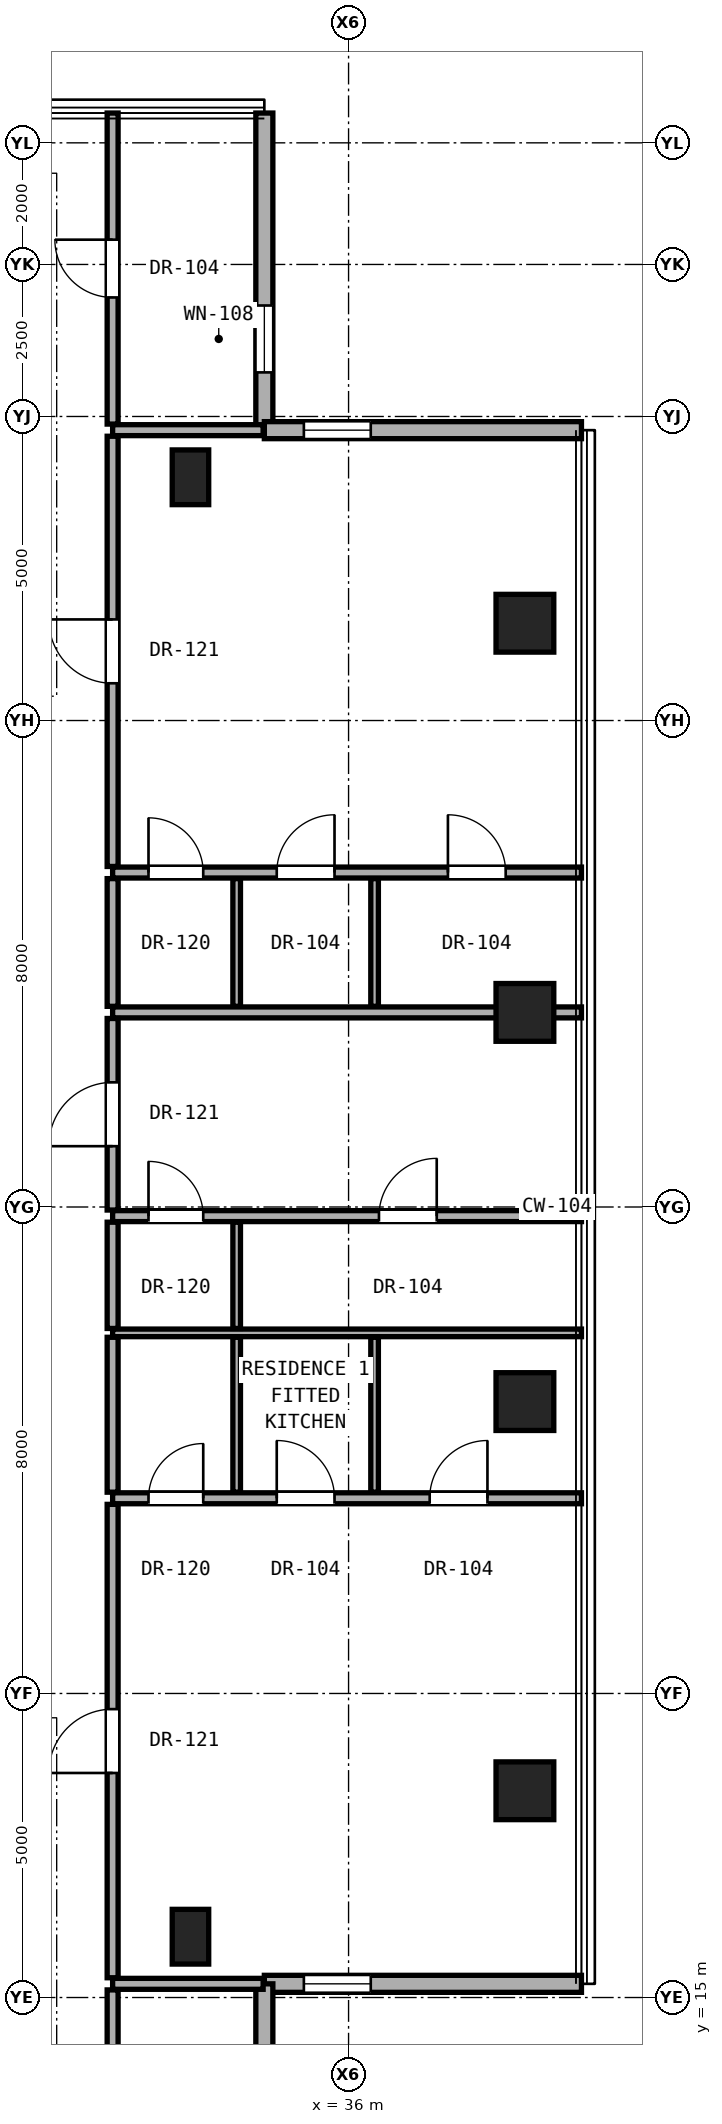
"""IFC4 building model, lengths in metres.
Left out: names, types, materials, properties, quantities, classifications, styles, units other than length and angle.
Written with IfcOpenShell. Run it as: python <this file> out.ifc"""

import sys

from ifc_helpers import new_model, si_unit, direction, frame, frame_2d, origin, origin_2d, place, context, subcontext, project, spatial, rectangle, hollow_rectangle, extrude, element, fill, save


model = new_model("IFC4")
c1 = context("Model", 3, precision=1e-05, world=origin(), true_north=direction((0.0, 1.0)))
c2 = subcontext(c1, "Body", "Model", "MODEL_VIEW")
j1 = project(units=[si_unit("LENGTHUNIT", "METRE"), si_unit("PLANEANGLEUNIT", "RADIAN")], contexts=[c1])
p1 = place(None, origin())
s1 = spatial("IfcSite", under=j1, at=p1, CompositionType="ELEMENT")
p2 = place(p1, origin())
s2 = spatial("IfcBuilding", under=s1, at=p2, CompositionType="ELEMENT")
p3 = place(p2, frame((0.0, 0.0, 183.65)))
s3 = spatial("IfcBuildingStorey", under=s2, at=p3, CompositionType="ELEMENT", Elevation=183.65)
for number, where, z_axis, x_axis in (
    (1, (38.9, 18.4, 0.0), (0.0, 0.0, 1.0), (1.0, 0.0, 0.0)),
    (2, (38.9, 24.8, 0.0), (0.0, 0.0, 1.0), (1.0, 0.0, 0.0)),
    (3, (38.9, 31.2, 0.0), (0.0, 0.0, 1.0), (1.0, 0.0, 0.0)),
    (4, (38.9, 37.6, 0.0), (0.0, 0.0, 1.0), (1.0, 0.0, 0.0)),
):
    element("IfcColumn", number, at=place(p3, frame(where, z_axis=z_axis, x_axis=x_axis)), inside=s3, PredefinedType="COLUMN", context=c2, shape_type="SweptSolid", body=[
        extrude(hollow_rectangle(XDim=0.95, YDim=0.95, WallThickness=0.05, at=origin_2d()), origin(), (0.0, 0.0, 1.0), 3.25),
    ])
for number, where, z_axis, x_axis in (
    (5, (33.4, 16.0, 0.0), (0.0, 0.0, 1.0), (1.0, 0.0, 0.0)),
    (6, (33.4, 40.0, 0.0), (0.0, 0.0, 1.0), (1.0, 0.0, 0.0)),
):
    element("IfcColumn", number, at=place(p3, frame(where, z_axis=z_axis, x_axis=x_axis)), inside=s3, PredefinedType="PILASTER", context=c2, shape_type="SweptSolid", body=[
        extrude(rectangle(XDim=0.6, YDim=0.9, at=origin_2d()), origin(), (0.0, 0.0, 1.0), 3.25),
    ])
p4 = place(p3, frame((34.615, 40.775, 0.0), z_axis=(0.0, 0.0, 1.0), x_axis=(0.0, 1.0, 0.0)))
e7 = element("IfcWall", 7, at=p4, inside=s3, PredefinedType="SOLIDWALL", context=c2, shape_type="SweptSolid", body=[
    extrude(rectangle(XDim=5.215, YDim=0.28, at=frame_2d((2.607, 0.0))), origin(), (0.0, 0.0, 1.0), 3.03),
])
p5 = place(p4, frame((0.95, 0.0, 0.85)))
e8 = element("IfcOpeningElement", 8, at=p5, cuts=e7, PredefinedType="OPENING", context=c2, shape_type="SweptSolid", body=[
    extrude(rectangle(XDim=1.1, YDim=2.0, at=frame_2d((0.55, 1.0))), frame((0.0, 0.15, 0.0), z_axis=(0.0, -1.0, 0.0), x_axis=(1.0, 0.0, 0.0)), (0.0, 0.0, 1.0), 0.3),
])
p6 = place(p3, frame((34.615, 15.225, 0.0), z_axis=(0.0, 0.0, 1.0), x_axis=(1.0, 0.0, 0.0)))
e9 = element("IfcWall", 9, at=p6, inside=s3, PredefinedType="SOLIDWALL", context=c2, shape_type="SweptSolid", body=[
    extrude(rectangle(XDim=5.215, YDim=0.28, at=frame_2d((2.607, 0.0))), origin(), (0.0, 0.0, 1.0), 3.03),
])
p7 = place(p6, frame((0.65, 0.0, 0.85)))
e10 = element("IfcOpeningElement", 10, at=p7, cuts=e9, PredefinedType="OPENING", context=c2, shape_type="SweptSolid", body=[
    extrude(rectangle(XDim=1.1, YDim=2.0, at=frame_2d((0.55, 1.0))), frame((0.0, 0.15, 0.0), z_axis=(0.0, -1.0, 0.0), x_axis=(1.0, 0.0, 0.0)), (0.0, 0.0, 1.0), 0.3),
])
p8 = place(p3, frame((34.615, 10.01, 0.0), z_axis=(0.0, 0.0, 1.0), x_axis=(0.0, 1.0, 0.0)))
e11 = element("IfcWall", 11, at=p8, inside=s3, PredefinedType="SOLIDWALL", context=c2, shape_type="SweptSolid", body=[
    extrude(rectangle(XDim=5.215, YDim=0.28, at=frame_2d((2.607, 0.0))), origin(), (0.0, 0.0, 1.0), 3.03),
])
p9 = place(p3, frame((39.83, 40.775, 0.0), z_axis=(0.0, 0.0, 1.0), x_axis=(-1.0, 0.0, 0.0)))
e12 = element("IfcWall", 12, at=p9, inside=s3, PredefinedType="SOLIDWALL", context=c2, shape_type="SweptSolid", body=[
    extrude(rectangle(XDim=5.215, YDim=0.28, at=frame_2d((2.607, 0.0))), origin(), (0.0, 0.0, 1.0), 3.03),
])
p10 = place(p9, frame((3.465, 0.0, 0.85)))
e13 = element("IfcOpeningElement", 13, at=p10, cuts=e12, PredefinedType="OPENING", context=c2, shape_type="SweptSolid", body=[
    extrude(rectangle(XDim=1.1, YDim=2.0, at=frame_2d((0.55, 1.0))), frame((0.0, 0.15, 0.0), z_axis=(0.0, -1.0, 0.0), x_axis=(1.0, 0.0, 0.0)), (0.0, 0.0, 1.0), 0.3),
])
p11 = place(p3, frame((32.12, 15.225, 0.0), z_axis=(0.0, 0.0, 1.0), x_axis=(1.0, 0.0, 0.0)))
e14 = element("IfcWall", 14, at=p11, inside=s3, PredefinedType="PARTITIONING", context=c2, shape_type="SweptSolid", body=[
    extrude(rectangle(XDim=2.475, YDim=0.18, at=frame_2d((1.237, 0.0))), origin(), (0.0, 0.0, 1.0), 3.05),
])
p12 = place(p3, frame((32.12, 23.21, 0.0), z_axis=(0.0, 0.0, 1.0), x_axis=(1.0, 0.0, 0.0)))
e15 = element("IfcWall", 15, at=p12, inside=s3, PredefinedType="PARTITIONING", context=c2, shape_type="SweptSolid", body=[
    extrude(rectangle(XDim=7.71, YDim=0.18, at=frame_2d((3.855, 0.0))), origin(), (0.0, 0.0, 1.0), 2.269),
])
p13 = place(p12, frame((5.214, 0.0, 0.0)))
e16 = element("IfcOpeningElement", 16, at=p13, cuts=e15, PredefinedType="OPENING", context=c2, shape_type="SweptSolid", body=[
    extrude(rectangle(XDim=0.95, YDim=2.15, at=frame_2d((0.475, 1.075))), frame((0.0, 0.1, 0.0), z_axis=(0.0, -1.0, 0.0), x_axis=(1.0, 0.0, 0.0)), (0.0, 0.0, 1.0), 0.2),
])
p14 = place(p12, frame((2.699, 0.0, 0.0)))
e17 = element("IfcOpeningElement", 17, at=p14, cuts=e15, PredefinedType="OPENING", context=c2, shape_type="SweptSolid", body=[
    extrude(rectangle(XDim=0.95, YDim=2.15, at=frame_2d((0.475, 1.075))), frame((0.0, 0.1, 0.0), z_axis=(0.0, -1.0, 0.0), x_axis=(1.0, 0.0, 0.0)), (0.0, 0.0, 1.0), 0.2),
])
p15 = place(p12, frame((0.59, 0.0, 0.0)))
e18 = element("IfcOpeningElement", 18, at=p15, cuts=e15, PredefinedType="OPENING", context=c2, shape_type="SweptSolid", body=[
    extrude(rectangle(XDim=0.9, YDim=2.1, at=frame_2d((0.45, 1.05))), frame((0.0, 0.1, 0.0), z_axis=(0.0, -1.0, 0.0), x_axis=(1.0, 0.0, 0.0)), (0.0, 0.0, 1.0), 0.2),
])
p16 = place(p3, frame((32.12, 25.93, 0.0), z_axis=(0.0, 0.0, 1.0), x_axis=(1.0, 0.0, 0.0)))
e19 = element("IfcWall", 19, at=p16, inside=s3, PredefinedType="PARTITIONING", context=c2, shape_type="SweptSolid", body=[
    extrude(rectangle(XDim=7.71, YDim=0.125, at=frame_2d((3.855, 0.0))), origin(), (0.0, 0.0, 1.0), 2.269),
])
p17 = place(p3, frame((32.12, 27.85, 0.0), z_axis=(0.0, 0.0, 1.0), x_axis=(1.0, 0.0, 0.0)))
e20 = element("IfcWall", 20, at=p17, inside=s3, PredefinedType="PARTITIONING", context=c2, shape_type="SweptSolid", body=[
    extrude(rectangle(XDim=7.71, YDim=0.18, at=frame_2d((3.855, 0.0))), origin(), (0.0, 0.0, 1.0), 2.269),
])
p18 = place(p17, frame((4.38, 0.0, 0.0)))
e21 = element("IfcOpeningElement", 21, at=p18, cuts=e20, PredefinedType="OPENING", context=c2, shape_type="SweptSolid", body=[
    extrude(rectangle(XDim=0.95, YDim=2.15, at=frame_2d((0.475, 1.075))), frame((0.0, 0.1, 0.0), z_axis=(0.0, -1.0, 0.0), x_axis=(1.0, 0.0, 0.0)), (0.0, 0.0, 1.0), 0.2),
])
p19 = place(p17, frame((0.59, 0.0, 0.0)))
e22 = element("IfcOpeningElement", 22, at=p19, cuts=e20, PredefinedType="OPENING", context=c2, shape_type="SweptSolid", body=[
    extrude(rectangle(XDim=0.9, YDim=2.1, at=frame_2d((0.45, 1.05))), frame((0.0, 0.1, 0.0), z_axis=(0.0, -1.0, 0.0), x_axis=(1.0, 0.0, 0.0)), (0.0, 0.0, 1.0), 0.2),
])
p20 = place(p3, frame((32.12, 31.2, 0.0), z_axis=(0.0, 0.0, 1.0), x_axis=(1.0, 0.0, 0.0)))
e23 = element("IfcWall", 23, at=p20, inside=s3, PredefinedType="PARTITIONING", context=c2, shape_type="SweptSolid", body=[
    extrude(rectangle(XDim=7.71, YDim=0.18, at=frame_2d((3.855, 0.0))), origin(), (0.0, 0.0, 1.0), 2.269),
])
p21 = place(p3, frame((32.12, 33.5, 0.0), z_axis=(0.0, 0.0, 1.0), x_axis=(1.0, 0.0, 0.0)))
e24 = element("IfcWall", 24, at=p21, inside=s3, PredefinedType="PARTITIONING", context=c2, shape_type="SweptSolid", body=[
    extrude(rectangle(XDim=7.71, YDim=0.18, at=frame_2d((3.855, 0.0))), origin(), (0.0, 0.0, 1.0), 2.269),
])
p22 = place(p21, frame((5.514, 0.0, 0.0)))
e25 = element("IfcOpeningElement", 25, at=p22, cuts=e24, PredefinedType="OPENING", context=c2, shape_type="SweptSolid", body=[
    extrude(rectangle(XDim=0.95, YDim=2.15, at=frame_2d((0.475, 1.075))), frame((0.0, 0.1, 0.0), z_axis=(0.0, -1.0, 0.0), x_axis=(1.0, 0.0, 0.0)), (0.0, 0.0, 1.0), 0.2),
])
p23 = place(p21, frame((2.699, 0.0, 0.0)))
e26 = element("IfcOpeningElement", 26, at=p23, cuts=e24, PredefinedType="OPENING", context=c2, shape_type="SweptSolid", body=[
    extrude(rectangle(XDim=0.95, YDim=2.15, at=frame_2d((0.475, 1.075))), frame((0.0, 0.1, 0.0), z_axis=(0.0, -1.0, 0.0), x_axis=(1.0, 0.0, 0.0)), (0.0, 0.0, 1.0), 0.2),
])
p24 = place(p21, frame((0.59, 0.0, 0.0)))
e27 = element("IfcOpeningElement", 27, at=p24, cuts=e24, PredefinedType="OPENING", context=c2, shape_type="SweptSolid", body=[
    extrude(rectangle(XDim=0.9, YDim=2.1, at=frame_2d((0.45, 1.05))), frame((0.0, 0.1, 0.0), z_axis=(0.0, -1.0, 0.0), x_axis=(1.0, 0.0, 0.0)), (0.0, 0.0, 1.0), 0.2),
])
p25 = place(p3, frame((32.12, 40.775, 0.0), z_axis=(0.0, 0.0, 1.0), x_axis=(1.0, 0.0, 0.0)))
e28 = element("IfcWall", 28, at=p25, inside=s3, PredefinedType="PARTITIONING", context=c2, shape_type="SweptSolid", body=[
    extrude(rectangle(XDim=2.475, YDim=0.18, at=frame_2d((1.237, 0.0))), origin(), (0.0, 0.0, 1.0), 3.05),
])
p26 = place(p3, frame((32.12, 10.01, 0.0), z_axis=(0.0, 0.0, 1.0), x_axis=(0.0, 1.0, 0.0)))
e29 = element("IfcWall", 29, at=p26, inside=s3, PredefinedType="PARTITIONING", context=c2, shape_type="SweptSolid", body=[
    extrude(rectangle(XDim=5.115, YDim=0.18, at=frame_2d((2.558, 0.0))), origin(), (0.0, 0.0, 1.0), 3.05),
])
p27 = place(p26, frame((2.083, 0.0, 0.0)))
e30 = element("IfcOpeningElement", 30, at=p27, cuts=e29, PredefinedType="OPENING", context=c2, shape_type="SweptSolid", body=[
    extrude(rectangle(XDim=0.95, YDim=2.15, at=frame_2d((0.475, 1.075))), frame((0.0, 0.1, 0.0), z_axis=(0.0, -1.0, 0.0), x_axis=(1.0, 0.0, 0.0)), (0.0, 0.0, 1.0), 0.2),
])
p28 = place(p3, frame((32.12, 15.325, 0.0), z_axis=(0.0, 0.0, 1.0), x_axis=(0.0, 1.0, 0.0)))
e31 = element("IfcWall", 31, at=p28, inside=s3, PredefinedType="PARTITIONING", context=c2, shape_type="SweptSolid", body=[
    extrude(rectangle(XDim=7.785, YDim=0.18, at=frame_2d((3.893, 0.0))), origin(), (0.0, 0.0, 1.0), 2.442),
])
p29 = place(p28, frame((3.367, 0.0, 0.0)))
e32 = element("IfcOpeningElement", 32, at=p29, cuts=e31, PredefinedType="OPENING", context=c2, shape_type="SweptSolid", body=[
    extrude(rectangle(XDim=1.05, YDim=2.2, at=frame_2d((0.525, 1.1))), frame((0.0, 0.1, 0.0), z_axis=(0.0, -1.0, 0.0), x_axis=(1.0, 0.0, 0.0)), (0.0, 0.0, 1.0), 0.2),
])
p30 = place(p3, frame((32.12, 23.31, 0.0), z_axis=(0.0, 0.0, 1.0), x_axis=(0.0, 1.0, 0.0)))
e33 = element("IfcWall", 33, at=p30, inside=s3, PredefinedType="PARTITIONING", context=c2, shape_type="SweptSolid", body=[
    extrude(rectangle(XDim=2.547, YDim=0.18, at=frame_2d((1.274, 0.0))), origin(), (0.0, 0.0, 1.0), 2.346),
])
p31 = place(p3, frame((32.12, 26.002, 0.0), z_axis=(0.0, 0.0, 1.0), x_axis=(0.0, 1.0, 0.0)))
e34 = element("IfcWall", 34, at=p31, inside=s3, PredefinedType="PARTITIONING", context=c2, shape_type="SweptSolid", body=[
    extrude(rectangle(XDim=1.748, YDim=0.18, at=frame_2d((0.874, 0.0))), origin(), (0.0, 0.0, 1.0), 3.05),
])
p32 = place(p3, frame((32.12, 27.95, 0.0), z_axis=(0.0, 0.0, 1.0), x_axis=(0.0, 1.0, 0.0)))
e35 = element("IfcWall", 35, at=p32, inside=s3, PredefinedType="PARTITIONING", context=c2, shape_type="SweptSolid", body=[
    extrude(rectangle(XDim=3.15, YDim=0.18, at=frame_2d((1.575, 0.0))), origin(), (0.0, 0.0, 1.0), 2.346),
])
p33 = place(p32, frame((1.05, 0.0, 0.0)))
e36 = element("IfcOpeningElement", 36, at=p33, cuts=e35, PredefinedType="OPENING", context=c2, shape_type="SweptSolid", body=[
    extrude(rectangle(XDim=1.05, YDim=2.2, at=frame_2d((0.525, 1.1))), frame((0.0, 0.1, 0.0), z_axis=(0.0, -1.0, 0.0), x_axis=(1.0, 0.0, 0.0)), (0.0, 0.0, 1.0), 0.2),
])
p34 = place(p3, frame((32.12, 31.3, 0.0), z_axis=(0.0, 0.0, 1.0), x_axis=(0.0, 1.0, 0.0)))
e37 = element("IfcWall", 37, at=p34, inside=s3, PredefinedType="PARTITIONING", context=c2, shape_type="SweptSolid", body=[
    extrude(rectangle(XDim=2.1, YDim=0.18, at=frame_2d((1.05, 0.0))), origin(), (0.0, 0.0, 1.0), 2.346),
])
p35 = place(p3, frame((32.12, 33.6, 0.0), z_axis=(0.0, 0.0, 1.0), x_axis=(0.0, 1.0, 0.0)))
e38 = element("IfcWall", 38, at=p35, inside=s3, PredefinedType="PARTITIONING", context=c2, shape_type="SweptSolid", body=[
    extrude(rectangle(XDim=7.075, YDim=0.18, at=frame_2d((3.538, 0.0))), origin(), (0.0, 0.0, 1.0), 2.442),
])
p36 = place(p35, frame((3.012, 0.0, 0.0)))
e39 = element("IfcOpeningElement", 39, at=p36, cuts=e38, PredefinedType="OPENING", context=c2, shape_type="SweptSolid", body=[
    extrude(rectangle(XDim=1.05, YDim=2.2, at=frame_2d((0.525, 1.1))), frame((0.0, 0.1, 0.0), z_axis=(0.0, -1.0, 0.0), x_axis=(1.0, 0.0, 0.0)), (0.0, 0.0, 1.0), 0.2),
])
p37 = place(p3, frame((32.12, 40.875, 0.0), z_axis=(0.0, 0.0, 1.0), x_axis=(0.0, 1.0, 0.0)))
e40 = element("IfcWall", 40, at=p37, inside=s3, PredefinedType="PARTITIONING", context=c2, shape_type="SweptSolid", body=[
    extrude(rectangle(XDim=5.115, YDim=0.18, at=frame_2d((2.558, 0.0))), origin(), (0.0, 0.0, 1.0), 3.05),
])
p38 = place(p37, frame((2.083, 0.0, 0.0)))
e41 = element("IfcOpeningElement", 41, at=p38, cuts=e40, PredefinedType="OPENING", context=c2, shape_type="SweptSolid", body=[
    extrude(rectangle(XDim=0.95, YDim=2.15, at=frame_2d((0.475, 1.075))), frame((0.0, 0.1, 0.0), z_axis=(0.0, -1.0, 0.0), x_axis=(1.0, 0.0, 0.0)), (0.0, 0.0, 1.0), 0.2),
])
p39 = place(p3, frame((34.16, 23.31, 0.0), z_axis=(0.0, 0.0, 1.0), x_axis=(0.0, 1.0, 0.0)))
e42 = element("IfcWall", 42, at=p39, inside=s3, PredefinedType="PARTITIONING", context=c2, shape_type="SweptSolid", body=[
    extrude(rectangle(XDim=2.547, YDim=0.125, at=frame_2d((1.274, 0.0))), origin(), (0.0, 0.0, 1.0), 2.346),
])
p40 = place(p3, frame((34.16, 26.002, 0.0), z_axis=(0.0, 0.0, 1.0), x_axis=(0.0, 1.0, 0.0)))
e43 = element("IfcWall", 43, at=p40, inside=s3, PredefinedType="PARTITIONING", context=c2, shape_type="SweptSolid", body=[
    extrude(rectangle(XDim=1.748, YDim=0.125, at=frame_2d((0.874, 0.0))), origin(), (0.0, 0.0, 1.0), 3.05),
])
p41 = place(p3, frame((34.16, 31.3, 0.0), z_axis=(0.0, 0.0, 1.0), x_axis=(0.0, 1.0, 0.0)))
e44 = element("IfcWall", 44, at=p41, inside=s3, PredefinedType="PARTITIONING", context=c2, shape_type="SweptSolid", body=[
    extrude(rectangle(XDim=2.1, YDim=0.125, at=frame_2d((1.05, 0.0))), origin(), (0.0, 0.0, 1.0), 2.346),
])
p42 = place(p3, frame((36.428, 23.31, 0.0), z_axis=(0.0, 0.0, 1.0), x_axis=(0.0, 1.0, 0.0)))
e45 = element("IfcWall", 45, at=p42, inside=s3, PredefinedType="PARTITIONING", context=c2, shape_type="SweptSolid", body=[
    extrude(rectangle(XDim=2.547, YDim=0.125, at=frame_2d((1.274, 0.0))), origin(), (0.0, 0.0, 1.0), 2.346),
])
p43 = place(p3, frame((36.428, 31.3, 0.0), z_axis=(0.0, 0.0, 1.0), x_axis=(0.0, 1.0, 0.0)))
e46 = element("IfcWall", 46, at=p43, inside=s3, PredefinedType="PARTITIONING", context=c2, shape_type="SweptSolid", body=[
    extrude(rectangle(XDim=2.1, YDim=0.125, at=frame_2d((1.05, 0.0))), origin(), (0.0, 0.0, 1.0), 2.346),
])
p44 = place(p5, origin())
e47 = element("IfcWindow", 47, at=p44, inside=s3, PartitioningType="SINGLE_PANEL", PredefinedType="WINDOW", context=c2, shape_type="SweptSolid", body=[
    extrude(rectangle(XDim=1.1, YDim=2.0, at=frame_2d((0.55, 1.0))), frame((0.0, 0.03, 0.0), z_axis=(0.0, -1.0, 0.0), x_axis=(1.0, 0.0, 0.0)), (0.0, 0.0, 1.0), 0.06),
])
fill(e8, e47)
p45 = place(p7, origin())
e48 = element("IfcWindow", 48, at=p45, inside=s3, PartitioningType="SINGLE_PANEL", PredefinedType="WINDOW", context=c2, shape_type="SweptSolid", body=[
    extrude(rectangle(XDim=1.1, YDim=2.0, at=frame_2d((0.55, 1.0))), frame((0.0, 0.03, 0.0), z_axis=(0.0, -1.0, 0.0), x_axis=(1.0, 0.0, 0.0)), (0.0, 0.0, 1.0), 0.06),
])
fill(e10, e48)
p46 = place(p10, origin())
e49 = element("IfcWindow", 49, at=p46, inside=s3, PartitioningType="SINGLE_PANEL", PredefinedType="WINDOW", context=c2, shape_type="SweptSolid", body=[
    extrude(rectangle(XDim=1.1, YDim=2.0, at=frame_2d((0.55, 1.0))), frame((0.0, 0.03, 0.0), z_axis=(0.0, -1.0, 0.0), x_axis=(1.0, 0.0, 0.0)), (0.0, 0.0, 1.0), 0.06),
])
fill(e13, e49)
p47 = place(p29, origin())
e50 = element("IfcDoor", 50, at=p47, inside=s3, OperationType="SINGLE_SWING_LEFT", PredefinedType="DOOR", context=c2, shape_type="SweptSolid", body=[
    extrude(rectangle(XDim=1.05, YDim=2.2, at=frame_2d((0.525, 1.1))), frame((0.0, 0.025, 0.0), z_axis=(0.0, -1.0, 0.0), x_axis=(1.0, 0.0, 0.0)), (0.0, 0.0, 1.0), 0.05),
])
fill(e32, e50)
p48 = place(p13, origin())
e51 = element("IfcDoor", 51, at=p48, inside=s3, OperationType="SINGLE_SWING_RIGHT", PredefinedType="DOOR", context=c2, shape_type="SweptSolid", body=[
    extrude(rectangle(XDim=0.95, YDim=2.15, at=frame_2d((0.475, 1.075))), frame((0.0, 0.025, 0.0), z_axis=(0.0, -1.0, 0.0), x_axis=(1.0, 0.0, 0.0)), (0.0, 0.0, 1.0), 0.05),
])
fill(e16, e51)
p49 = place(p14, origin())
e52 = element("IfcDoor", 52, at=p49, inside=s3, OperationType="SINGLE_SWING_LEFT", PredefinedType="DOOR", context=c2, shape_type="SweptSolid", body=[
    extrude(rectangle(XDim=0.95, YDim=2.15, at=frame_2d((0.475, 1.075))), frame((0.0, 0.025, 0.0), z_axis=(0.0, -1.0, 0.0), x_axis=(1.0, 0.0, 0.0)), (0.0, 0.0, 1.0), 0.05),
])
fill(e17, e52)
p50 = place(p15, origin())
e53 = element("IfcDoor", 53, at=p50, inside=s3, OperationType="SINGLE_SWING_RIGHT", PredefinedType="DOOR", context=c2, shape_type="SweptSolid", body=[
    extrude(rectangle(XDim=0.9, YDim=2.1, at=frame_2d((0.45, 1.05))), frame((0.0, 0.025, 0.0), z_axis=(0.0, -1.0, 0.0), x_axis=(1.0, 0.0, 0.0)), (0.0, 0.0, 1.0), 0.05),
])
fill(e18, e53)
p51 = place(p33, origin())
e54 = element("IfcDoor", 54, at=p51, inside=s3, OperationType="SINGLE_SWING_LEFT", PredefinedType="DOOR", context=c2, shape_type="SweptSolid", body=[
    extrude(rectangle(XDim=1.05, YDim=2.2, at=frame_2d((0.525, 1.1))), frame((0.0, 0.025, 0.0), z_axis=(0.0, -1.0, 0.0), x_axis=(1.0, 0.0, 0.0)), (0.0, 0.0, 1.0), 0.05),
])
fill(e36, e54)
p52 = place(p18, origin())
e55 = element("IfcDoor", 55, at=p52, inside=s3, OperationType="SINGLE_SWING_RIGHT", PredefinedType="DOOR", context=c2, shape_type="SweptSolid", body=[
    extrude(rectangle(XDim=0.95, YDim=2.15, at=frame_2d((0.475, 1.075))), frame((0.0, 0.025, 0.0), z_axis=(0.0, -1.0, 0.0), x_axis=(1.0, 0.0, 0.0)), (0.0, 0.0, 1.0), 0.05),
])
fill(e21, e55)
p53 = place(p19, origin())
e56 = element("IfcDoor", 56, at=p53, inside=s3, OperationType="SINGLE_SWING_LEFT", PredefinedType="DOOR", context=c2, shape_type="SweptSolid", body=[
    extrude(rectangle(XDim=0.9, YDim=2.1, at=frame_2d((0.45, 1.05))), frame((0.0, 0.025, 0.0), z_axis=(0.0, -1.0, 0.0), x_axis=(1.0, 0.0, 0.0)), (0.0, 0.0, 1.0), 0.05),
])
fill(e22, e56)
p54 = place(p36, origin())
e57 = element("IfcDoor", 57, at=p54, inside=s3, OperationType="SINGLE_SWING_RIGHT", PredefinedType="DOOR", context=c2, shape_type="SweptSolid", body=[
    extrude(rectangle(XDim=1.05, YDim=2.2, at=frame_2d((0.525, 1.1))), frame((0.0, 0.025, 0.0), z_axis=(0.0, -1.0, 0.0), x_axis=(1.0, 0.0, 0.0)), (0.0, 0.0, 1.0), 0.05),
])
fill(e39, e57)
p55 = place(p22, origin())
e58 = element("IfcDoor", 58, at=p55, inside=s3, OperationType="SINGLE_SWING_LEFT", PredefinedType="DOOR", context=c2, shape_type="SweptSolid", body=[
    extrude(rectangle(XDim=0.95, YDim=2.15, at=frame_2d((0.475, 1.075))), frame((0.0, 0.025, 0.0), z_axis=(0.0, -1.0, 0.0), x_axis=(1.0, 0.0, 0.0)), (0.0, 0.0, 1.0), 0.05),
])
fill(e25, e58)
p56 = place(p23, origin())
e59 = element("IfcDoor", 59, at=p56, inside=s3, OperationType="SINGLE_SWING_RIGHT", PredefinedType="DOOR", context=c2, shape_type="SweptSolid", body=[
    extrude(rectangle(XDim=0.95, YDim=2.15, at=frame_2d((0.475, 1.075))), frame((0.0, 0.025, 0.0), z_axis=(0.0, -1.0, 0.0), x_axis=(1.0, 0.0, 0.0)), (0.0, 0.0, 1.0), 0.05),
])
fill(e26, e59)
p57 = place(p24, origin())
e60 = element("IfcDoor", 60, at=p57, inside=s3, OperationType="SINGLE_SWING_LEFT", PredefinedType="DOOR", context=c2, shape_type="SweptSolid", body=[
    extrude(rectangle(XDim=0.9, YDim=2.1, at=frame_2d((0.45, 1.05))), frame((0.0, 0.025, 0.0), z_axis=(0.0, -1.0, 0.0), x_axis=(1.0, 0.0, 0.0)), (0.0, 0.0, 1.0), 0.05),
])
fill(e27, e60)
p58 = place(p38, origin())
e61 = element("IfcDoor", 61, at=p58, inside=s3, OperationType="SINGLE_SWING_RIGHT", PredefinedType="DOOR", context=c2, shape_type="SweptSolid", body=[
    extrude(rectangle(XDim=0.95, YDim=2.15, at=frame_2d((0.475, 1.075))), frame((0.0, 0.025, 0.0), z_axis=(0.0, -1.0, 0.0), x_axis=(1.0, 0.0, 0.0)), (0.0, 0.0, 1.0), 0.05),
])
fill(e41, e61)
save(model, sys.argv[1])
